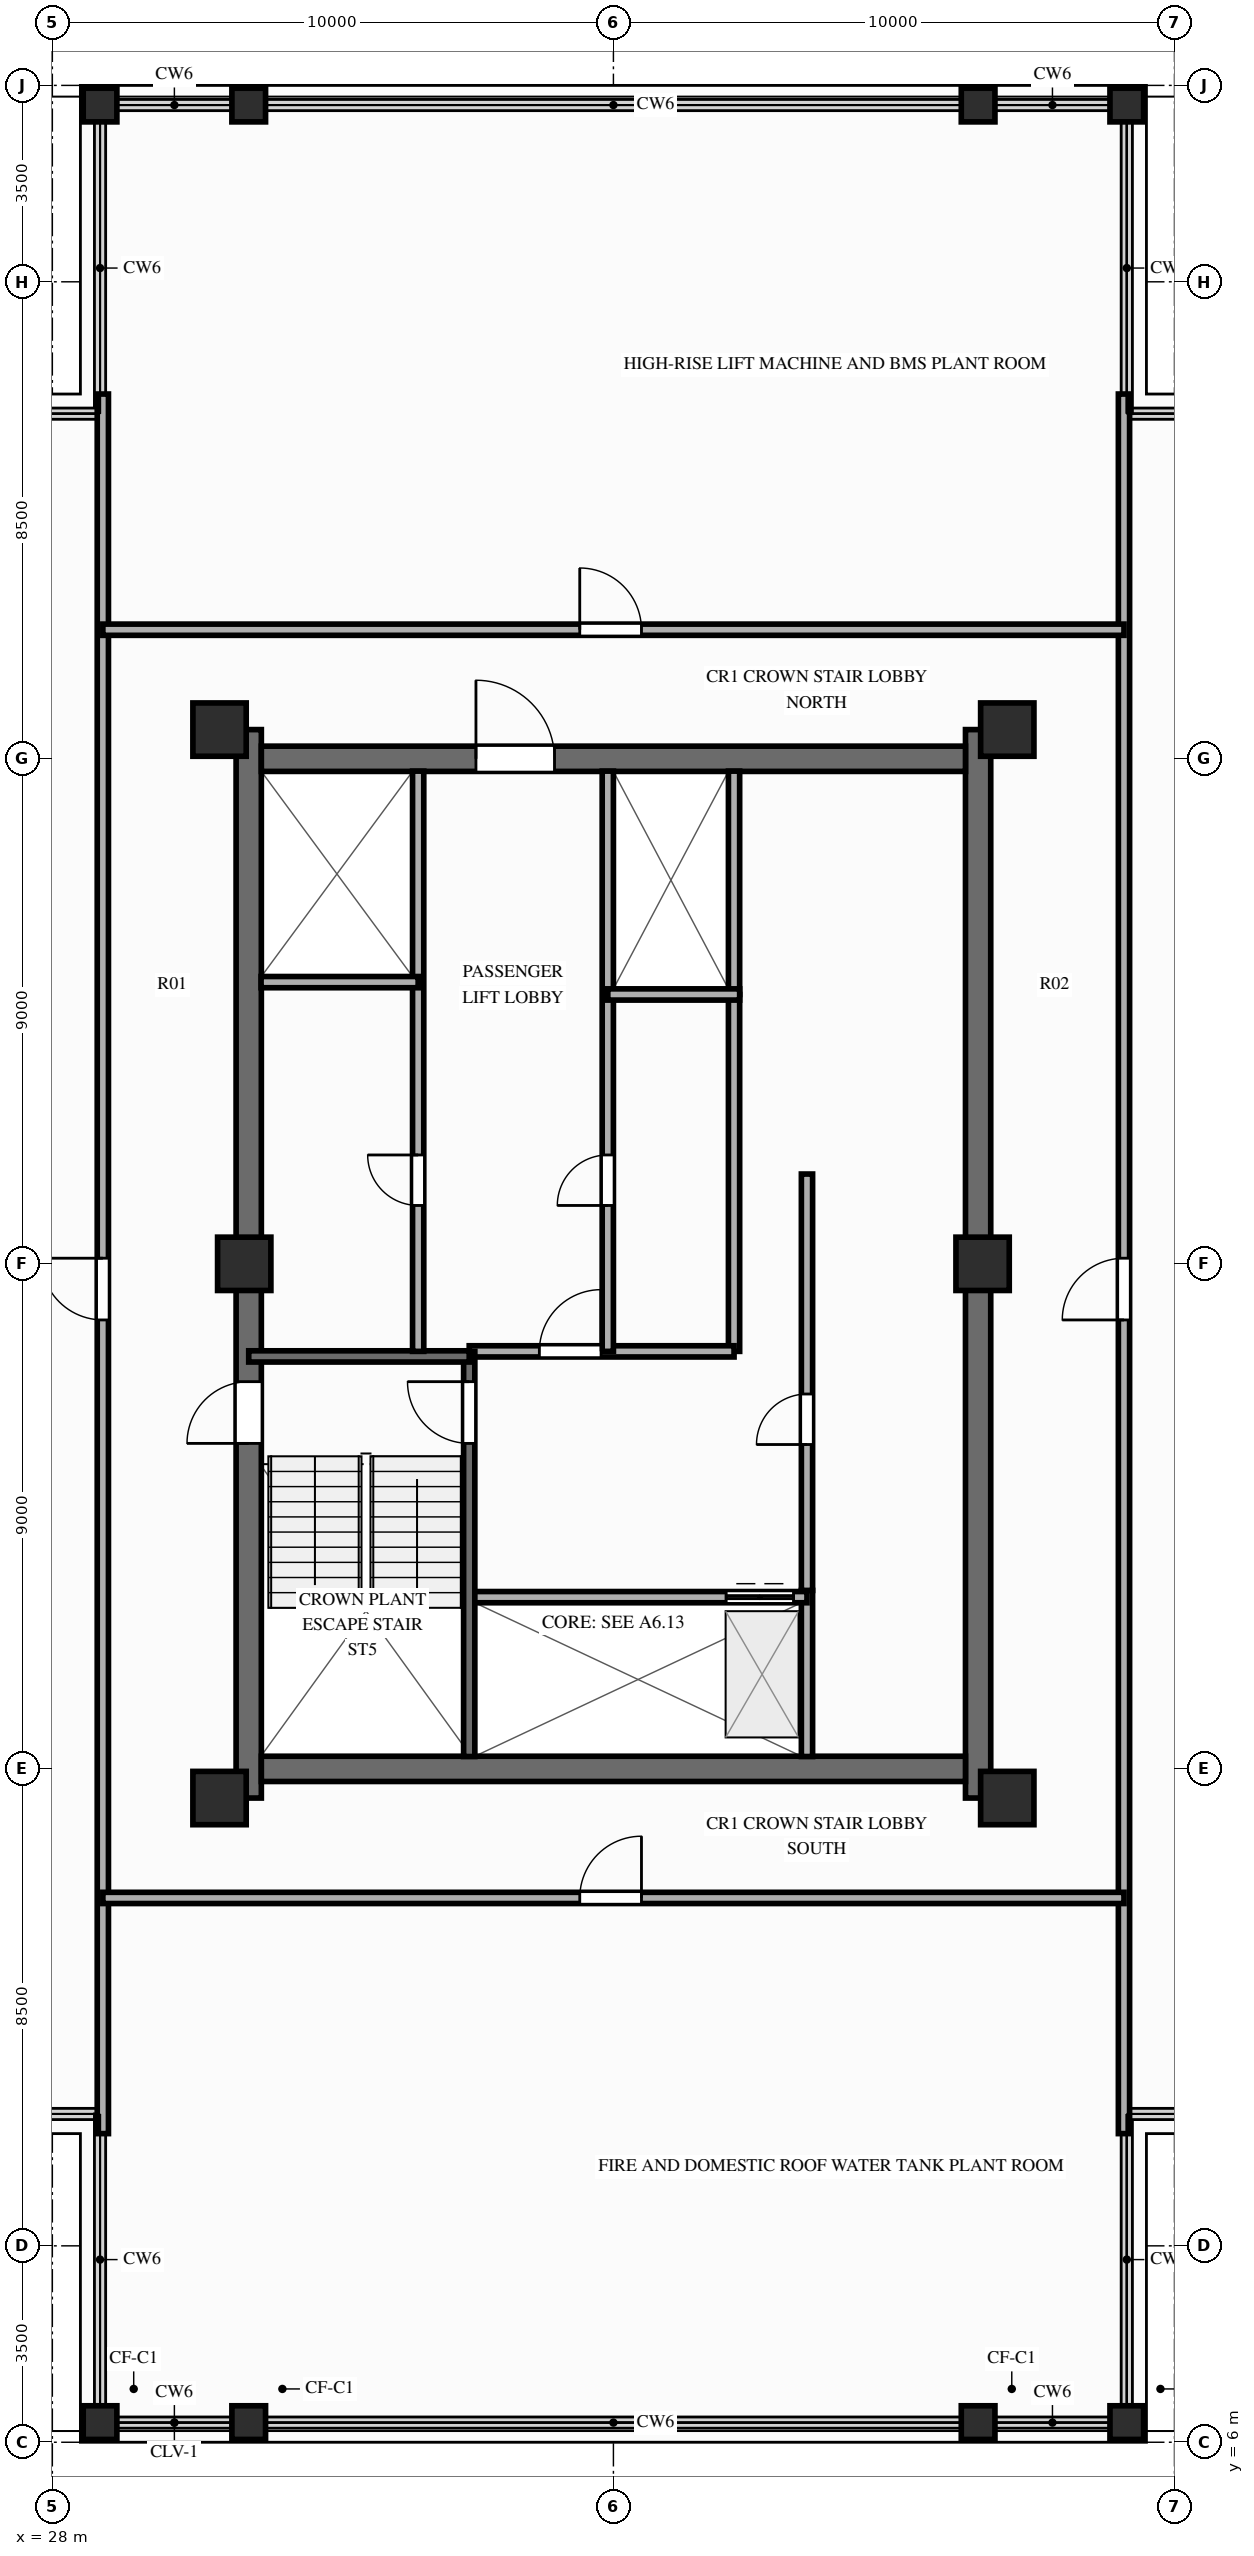
"""IFC4 building model, lengths in metres.
Left out: names, types, materials, properties, quantities, classifications, styles, units other than length and angle.
Written with IfcOpenShell. Run it as: python <this file> out.ifc"""

import sys

from ifc_helpers import new_model, si_unit, direction, frame, frame_2d, origin, origin_2d, place, context, subcontext, project, spatial, rectangle, extrude, source, transform, mapped, element, fill, save


model = new_model("IFC4")
c1 = context("Model", 3, precision=1e-05, world=origin(), true_north=direction((0.0, 1.0)))
c2 = subcontext(c1, "Body", "Model", "MODEL_VIEW")
j1 = project(units=[si_unit("LENGTHUNIT", "METRE"), si_unit("PLANEANGLEUNIT", "RADIAN")], contexts=[c1])
p1 = place(None, origin())
s1 = spatial("IfcSite", under=j1, at=p1, CompositionType="ELEMENT")
p2 = place(p1, origin())
s2 = spatial("IfcBuilding", under=s1, at=p2, CompositionType="ELEMENT")
p3 = place(p2, frame((0.0, 0.0, 252.2)))
s3 = spatial("IfcBuildingStorey", under=s2, at=p3, CompositionType="ELEMENT", Elevation=252.2)
p4 = place(p3, frame((31.5, 17.48, 0.0), z_axis=(0.0, 0.0, 1.0), x_axis=(0.0, 1.0, 0.0)))
e1 = element("IfcWall", 1, at=p4, inside=s3, PredefinedType="SHEAR", context=c2, shape_type="SweptSolid", body=[
    extrude(rectangle(XDim=19.04, YDim=0.45, at=frame_2d((9.52, 0.0))), origin(), (0.0, 0.0, 1.0), 3.8),
])
p5 = place(p4, frame((6.32, 0.0, 0.0)))
e2 = element("IfcOpeningElement", 2, at=p5, cuts=e1, PredefinedType="OPENING", context=c2, shape_type="SweptSolid", body=[
    extrude(rectangle(XDim=1.1, YDim=2.15, at=frame_2d((0.55, 1.075))), frame((0.0, 0.237, 0.0), z_axis=(0.0, -1.0, 0.0), x_axis=(1.0, 0.0, 0.0)), (0.0, 0.0, 1.0), 0.474),
])
p6 = place(p3, frame((44.5, 17.48, 0.0), z_axis=(0.0, 0.0, 1.0), x_axis=(0.0, 1.0, 0.0)))
e3 = element("IfcWall", 3, at=p6, inside=s3, PredefinedType="SHEAR", context=c2, shape_type="SweptSolid", body=[
    extrude(rectangle(XDim=19.04, YDim=0.45, at=frame_2d((9.52, 0.0))), origin(), (0.0, 0.0, 1.0), 3.8),
])
p7 = place(p3, frame((31.725, 18.0, 0.0), z_axis=(0.0, 0.0, 1.0), x_axis=(1.0, 0.0, 0.0)))
e4 = element("IfcWall", 4, at=p7, inside=s3, PredefinedType="SHEAR", context=c2, shape_type="SweptSolid", body=[
    extrude(rectangle(XDim=12.55, YDim=0.45, at=frame_2d((6.275, 0.0))), origin(), (0.0, 0.0, 1.0), 3.8),
])
p8 = place(p3, frame((31.725, 36.0, 0.0), z_axis=(0.0, 0.0, 1.0), x_axis=(1.0, 0.0, 0.0)))
e5 = element("IfcWall", 5, at=p8, inside=s3, PredefinedType="SHEAR", context=c2, shape_type="SweptSolid", body=[
    extrude(rectangle(XDim=12.55, YDim=0.45, at=frame_2d((6.275, 0.0))), origin(), (0.0, 0.0, 1.0), 3.8),
])
p9 = place(p8, frame((5.225, 0.0, 0.0), z_axis=(0.0, 0.0, 1.0), x_axis=(-1.0, 0.0, 0.0)))
e6 = element("IfcOpeningElement", 6, at=p9, cuts=e5, PredefinedType="OPENING", context=c2, shape_type="SweptSolid", body=[
    extrude(rectangle(XDim=1.4, YDim=2.15, at=frame_2d((0.7, 1.075))), frame((0.0, 0.237, 0.0), z_axis=(0.0, -1.0, 0.0), x_axis=(1.0, 0.0, 0.0)), (0.0, 0.0, 1.0), 0.474),
])
m1 = source(origin(), c2, "Body", "SweptSolid", [
    extrude(rectangle(XDim=0.95, YDim=0.95, at=origin_2d()), origin(), (0.0, 0.0, 1.0), 3.8),
])
for number, where, z_axis, x_axis in (
    (7, (30.98, 17.48, 0.0), (0.0, 0.0, 1.0), (1.0, 0.0, 0.0)),
    (8, (45.02, 17.48, 0.0), (0.0, 0.0, 1.0), (1.0, 0.0, 0.0)),
    (9, (30.98, 36.52, 0.0), (0.0, 0.0, 1.0), (1.0, 0.0, 0.0)),
    (10, (45.02, 36.52, 0.0), (0.0, 0.0, 1.0), (1.0, 0.0, 0.0)),
    (11, (31.42, 27.0, 0.0), (0.0, 0.0, 1.0), (1.0, 0.0, 0.0)),
    (12, (44.58, 27.0, 0.0), (0.0, 0.0, 1.0), (1.0, 0.0, 0.0)),
):
    element("IfcColumn", number, at=place(p3, frame(where, z_axis=z_axis, x_axis=x_axis)), inside=s3, PredefinedType="COLUMN", context=c2, shape_type="MappedRepresentation", body=[
        mapped(m1, transform((0.0, 0.0, 0.0), scale=1.0)),
    ])
m2 = source(origin(), c2, "Body", "SweptSolid", [
    extrude(rectangle(XDim=0.6, YDim=0.6, at=origin_2d()), origin(), (0.0, 0.0, 1.0), 3.8),
])
for number, where, z_axis, x_axis in (
    (13, (28.85, 6.35, 0.0), (0.0, 0.0, 1.0), (1.0, 0.0, 0.0)),
    (14, (31.5, 6.35, 0.0), (0.0, 0.0, 1.0), (1.0, 0.0, 0.0)),
    (15, (44.5, 6.35, 0.0), (0.0, 0.0, 1.0), (1.0, 0.0, 0.0)),
    (16, (47.15, 6.35, 0.0), (0.0, 0.0, 1.0), (1.0, 0.0, 0.0)),
    (17, (47.15, 47.65, 0.0), (0.0, 0.0, 1.0), (1.0, 0.0, 0.0)),
    (18, (44.5, 47.65, 0.0), (0.0, 0.0, 1.0), (1.0, 0.0, 0.0)),
    (19, (31.5, 47.65, 0.0), (0.0, 0.0, 1.0), (1.0, 0.0, 0.0)),
    (20, (28.85, 47.65, 0.0), (0.0, 0.0, 1.0), (1.0, 0.0, 0.0)),
):
    element("IfcColumn", number, at=place(p3, frame(where, z_axis=z_axis, x_axis=x_axis)), inside=s3, PredefinedType="COLUMN", context=c2, shape_type="MappedRepresentation", body=[
        mapped(m2, transform((0.0, 0.0, 0.0), scale=1.0)),
    ])
p10 = place(p3, frame((41.45, 18.22, 0.0), z_axis=(0.0, 0.0, 1.0), x_axis=(0.0, 1.0, 0.0)))
e21 = element("IfcWall", 21, at=p10, inside=s3, PredefinedType="PARTITIONING", context=c2, shape_type="SweptSolid", body=[
    extrude(rectangle(XDim=2.96, YDim=0.2, at=frame_2d((1.48, 0.0))), origin(), (0.0, 0.0, 1.0), 3.55),
])
p11 = place(p3, frame((41.45, 21.18, 0.0), z_axis=(0.0, 0.0, 1.0), x_axis=(0.0, 1.0, 0.0)))
e22 = element("IfcWall", 22, at=p11, inside=s3, PredefinedType="PARTITIONING", context=c2, shape_type="SweptSolid", body=[
    extrude(rectangle(XDim=7.42, YDim=0.2, at=frame_2d((3.71, 0.0))), origin(), (0.0, 0.0, 1.0), 3.55),
])
p12 = place(p11, frame((2.6, 0.0, 0.0)))
e23 = element("IfcOpeningElement", 23, at=p12, cuts=e22, PredefinedType="OPENING", context=c2, shape_type="SweptSolid", body=[
    extrude(rectangle(XDim=0.9, YDim=2.1, at=frame_2d((0.45, 1.05))), frame((0.0, 0.112, 0.0), z_axis=(0.0, -1.0, 0.0), x_axis=(1.0, 0.0, 0.0)), (0.0, 0.0, 1.0), 0.224),
])
p13 = place(p3, frame((40.15, 25.44, 0.0), z_axis=(0.0, 0.0, 1.0), x_axis=(0.0, 1.0, 0.0)))
e24 = element("IfcWall", 24, at=p13, inside=s3, PredefinedType="PARTITIONING", context=c2, shape_type="SweptSolid", body=[
    extrude(rectangle(XDim=6.36, YDim=0.2, at=frame_2d((3.18, 0.0))), origin(), (0.0, 0.0, 1.0), 3.55),
])
p14 = place(p3, frame((40.15, 31.8, 0.0), z_axis=(0.0, 0.0, 1.0), x_axis=(0.0, 1.0, 0.0)))
e25 = element("IfcWall", 25, at=p14, inside=s3, PredefinedType="PARTITIONING", context=c2, shape_type="SweptSolid", body=[
    extrude(rectangle(XDim=3.98, YDim=0.2, at=frame_2d((1.99, 0.0))), origin(), (0.0, 0.0, 1.0), 3.55),
])
p15 = place(p3, frame((35.43, 21.06, 0.0), z_axis=(0.0, 0.0, 1.0), x_axis=(1.0, 0.0, 0.0)))
e26 = element("IfcWall", 26, at=p15, inside=s3, PredefinedType="PARTITIONING", context=c2, shape_type="SweptSolid", body=[
    extrude(rectangle(XDim=6.02, YDim=0.2, at=frame_2d((3.01, 0.0))), origin(), (0.0, 0.0, 1.0), 3.55),
])
p16 = place(p15, frame((4.58, 0.0, 0.0)))
e27 = element("IfcOpeningElement", 27, at=p16, cuts=e26, PredefinedType="OPENING", context=c2, shape_type="SweptSolid", body=[
    extrude(rectangle(XDim=1.2, YDim=2.15, at=frame_2d((0.6, 1.075))), frame((0.0, 0.112, 0.0), z_axis=(0.0, -1.0, 0.0), x_axis=(1.0, 0.0, 0.0)), (0.0, 0.0, 1.0), 0.224),
])
p17 = place(p3, frame((35.43, 25.44, 0.0), z_axis=(0.0, 0.0, 1.0), x_axis=(1.0, 0.0, 0.0)))
e28 = element("IfcWall", 28, at=p17, inside=s3, PredefinedType="PARTITIONING", context=c2, shape_type="SweptSolid", body=[
    extrude(rectangle(XDim=4.72, YDim=0.2, at=frame_2d((2.36, 0.0))), origin(), (0.0, 0.0, 1.0), 2.952),
])
p18 = place(p17, frame((1.25, 0.0, 0.0)))
e29 = element("IfcOpeningElement", 29, at=p18, cuts=e28, PredefinedType="OPENING", context=c2, shape_type="SweptSolid", body=[
    extrude(rectangle(XDim=1.1, YDim=2.15, at=frame_2d((0.55, 1.075))), frame((0.0, 0.112, 0.0), z_axis=(0.0, -1.0, 0.0), x_axis=(1.0, 0.0, 0.0)), (0.0, 0.0, 1.0), 0.224),
])
p19 = place(p3, frame((35.43, 18.22, 0.0), z_axis=(0.0, 0.0, 1.0), x_axis=(0.0, 1.0, 0.0)))
e30 = element("IfcWall", 30, at=p19, inside=s3, PredefinedType="SOLIDWALL", context=c2, shape_type="SweptSolid", body=[
    extrude(rectangle(XDim=7.22, YDim=0.2, at=frame_2d((3.61, 0.0))), origin(), (0.0, 0.0, 1.0), 3.55),
])
p20 = place(p19, frame((6.68, 0.0, 0.0), z_axis=(0.0, 0.0, 1.0), x_axis=(-1.0, 0.0, 0.0)))
e31 = element("IfcOpeningElement", 31, at=p20, cuts=e30, PredefinedType="OPENING", context=c2, shape_type="SweptSolid", body=[
    extrude(rectangle(XDim=1.1, YDim=2.15, at=frame_2d((0.55, 1.075))), frame((0.0, 0.112, 0.0), z_axis=(0.0, -1.0, 0.0), x_axis=(1.0, 0.0, 0.0)), (0.0, 0.0, 1.0), 0.224),
])
p21 = place(p3, frame((31.5, 25.35, 0.0), z_axis=(0.0, 0.0, 1.0), x_axis=(1.0, 0.0, 0.0)))
e32 = element("IfcWall", 32, at=p21, inside=s3, PredefinedType="SOLIDWALL", context=c2, shape_type="SweptSolid", body=[
    extrude(rectangle(XDim=3.93, YDim=0.2, at=frame_2d((1.965, 0.0))), origin(), (0.0, 0.0, 1.0), 3.55),
])
p22 = place(p3, frame((34.52, 25.44, 0.0), z_axis=(0.0, 0.0, 1.0), x_axis=(0.0, 1.0, 0.0)))
e33 = element("IfcWall", 33, at=p22, inside=s3, PredefinedType="PARTITIONING", context=c2, shape_type="SweptSolid", body=[
    extrude(rectangle(XDim=10.34, YDim=0.2, at=frame_2d((5.17, 0.0))), origin(), (0.0, 0.0, 1.0), 3.55),
])
p23 = place(p22, frame((2.6, 0.0, 0.0)))
e34 = element("IfcOpeningElement", 34, at=p23, cuts=e33, PredefinedType="OPENING", context=c2, shape_type="SweptSolid", body=[
    extrude(rectangle(XDim=0.9, YDim=2.1, at=frame_2d((0.45, 1.05))), frame((0.0, 0.112, 0.0), z_axis=(0.0, -1.0, 0.0), x_axis=(1.0, 0.0, 0.0)), (0.0, 0.0, 1.0), 0.224),
])
p24 = place(p3, frame((31.72, 32.02, 0.0), z_axis=(0.0, 0.0, 1.0), x_axis=(1.0, 0.0, 0.0)))
e35 = element("IfcWall", 35, at=p24, inside=s3, PredefinedType="PARTITIONING", context=c2, shape_type="SweptSolid", body=[
    extrude(rectangle(XDim=2.8, YDim=0.2, at=frame_2d((1.4, 0.0))), origin(), (0.0, 0.0, 1.0), 3.55),
])
p25 = place(p3, frame((37.9, 25.44, 0.0), z_axis=(0.0, 0.0, 1.0), x_axis=(0.0, 1.0, 0.0)))
e36 = element("IfcWall", 36, at=p25, inside=s3, PredefinedType="PARTITIONING", context=c2, shape_type="SweptSolid", body=[
    extrude(rectangle(XDim=10.34, YDim=0.2, at=frame_2d((5.17, 0.0))), origin(), (0.0, 0.0, 1.0), 3.55),
])
p26 = place(p25, frame((2.6, 0.0, 0.0)))
e37 = element("IfcOpeningElement", 37, at=p26, cuts=e36, PredefinedType="OPENING", context=c2, shape_type="SweptSolid", body=[
    extrude(rectangle(XDim=0.9, YDim=2.1, at=frame_2d((0.45, 1.05))), frame((0.0, 0.112, 0.0), z_axis=(0.0, -1.0, 0.0), x_axis=(1.0, 0.0, 0.0)), (0.0, 0.0, 1.0), 0.224),
])
p27 = place(p3, frame((37.9, 31.8, 0.0), z_axis=(0.0, 0.0, 1.0), x_axis=(1.0, 0.0, 0.0)))
e38 = element("IfcWall", 38, at=p27, inside=s3, PredefinedType="PARTITIONING", context=c2, shape_type="SweptSolid", body=[
    extrude(rectangle(XDim=2.35, YDim=0.2, at=frame_2d((1.175, 0.0))), origin(), (0.0, 0.0, 1.0), 3.55),
])
p28 = place(p3, frame((28.9, 11.5, 0.0), z_axis=(0.0, 0.0, 1.0), x_axis=(0.0, 1.0, 0.0)))
e39 = element("IfcWall", 39, at=p28, inside=s3, PredefinedType="PARTITIONING", context=c2, shape_type="SweptSolid", body=[
    extrude(rectangle(XDim=31.0, YDim=0.2, at=frame_2d((15.5, 0.0))), origin(), (0.0, 0.0, 1.0), 3.55),
])
p29 = place(p28, frame((14.5, 0.0, 0.0)))
e40 = element("IfcOpeningElement", 40, at=p29, cuts=e39, PredefinedType="OPENING", context=c2, shape_type="SweptSolid", body=[
    extrude(rectangle(XDim=1.1, YDim=2.15, at=frame_2d((0.55, 1.075))), frame((0.0, 0.112, 0.0), z_axis=(0.0, -1.0, 0.0), x_axis=(1.0, 0.0, 0.0)), (0.0, 0.0, 1.0), 0.224),
])
p30 = place(p3, frame((47.1, 11.5, 0.0), z_axis=(0.0, 0.0, 1.0), x_axis=(0.0, 1.0, 0.0)))
e41 = element("IfcWall", 41, at=p30, inside=s3, PredefinedType="PARTITIONING", context=c2, shape_type="SweptSolid", body=[
    extrude(rectangle(XDim=31.0, YDim=0.2, at=frame_2d((15.5, 0.0))), origin(), (0.0, 0.0, 1.0), 3.55),
])
p31 = place(p30, frame((14.5, 0.0, 0.0)))
e42 = element("IfcOpeningElement", 42, at=p31, cuts=e41, PredefinedType="OPENING", context=c2, shape_type="SweptSolid", body=[
    extrude(rectangle(XDim=1.1, YDim=2.15, at=frame_2d((0.55, 1.075))), frame((0.0, 0.112, 0.0), z_axis=(0.0, -1.0, 0.0), x_axis=(1.0, 0.0, 0.0)), (0.0, 0.0, 1.0), 0.224),
])
p32 = place(p3, frame((28.9, 15.7, 0.0), z_axis=(0.0, 0.0, 1.0), x_axis=(1.0, 0.0, 0.0)))
e43 = element("IfcWall", 43, at=p32, inside=s3, PredefinedType="PARTITIONING", context=c2, shape_type="SweptSolid", body=[
    extrude(rectangle(XDim=18.2, YDim=0.2, at=frame_2d((9.1, 0.0))), origin(), (0.0, 0.0, 1.0), 3.55),
])
p33 = place(p32, frame((8.5, 0.0, 0.0)))
e44 = element("IfcOpeningElement", 44, at=p33, cuts=e43, PredefinedType="OPENING", context=c2, shape_type="SweptSolid", body=[
    extrude(rectangle(XDim=1.1, YDim=2.15, at=frame_2d((0.55, 1.075))), frame((0.0, 0.112, 0.0), z_axis=(0.0, -1.0, 0.0), x_axis=(1.0, 0.0, 0.0)), (0.0, 0.0, 1.0), 0.224),
])
p34 = place(p3, frame((28.9, 38.3, 0.0), z_axis=(0.0, 0.0, 1.0), x_axis=(1.0, 0.0, 0.0)))
e45 = element("IfcWall", 45, at=p34, inside=s3, PredefinedType="PARTITIONING", context=c2, shape_type="SweptSolid", body=[
    extrude(rectangle(XDim=18.2, YDim=0.2, at=frame_2d((9.1, 0.0))), origin(), (0.0, 0.0, 1.0), 3.55),
])
p35 = place(p34, frame((8.5, 0.0, 0.0)))
e46 = element("IfcOpeningElement", 46, at=p35, cuts=e45, PredefinedType="OPENING", context=c2, shape_type="SweptSolid", body=[
    extrude(rectangle(XDim=1.1, YDim=2.15, at=frame_2d((0.55, 1.075))), frame((0.0, 0.112, 0.0), z_axis=(0.0, -1.0, 0.0), x_axis=(1.0, 0.0, 0.0)), (0.0, 0.0, 1.0), 0.224),
])
m3 = source(origin(), c2, "Body", "SweptSolid", [
    extrude(rectangle(XDim=1.1, YDim=2.15, at=frame_2d((0.55, 1.075))), frame((0.0, 0.025, 0.0), z_axis=(0.0, -1.0, 0.0), x_axis=(1.0, 0.0, 0.0)), (0.0, 0.0, 1.0), 0.05),
])
p36 = place(p5, origin())
e47 = element("IfcDoor", 47, at=p36, inside=s3, OperationType="SINGLE_SWING_LEFT", PredefinedType="DOOR", context=c2, shape_type="MappedRepresentation", body=[
    mapped(m3, transform((0.0, 0.0, 0.0), scale=1.0)),
])
fill(e2, e47)
m4 = source(origin(), c2, "Body", "SweptSolid", [
    extrude(rectangle(XDim=1.4, YDim=2.15, at=frame_2d((0.7, 1.075))), frame((0.0, 0.025, 0.0), z_axis=(0.0, -1.0, 0.0), x_axis=(1.0, 0.0, 0.0)), (0.0, 0.0, 1.0), 0.05),
])
p37 = place(p9, origin())
e48 = element("IfcDoor", 48, at=p37, inside=s3, OperationType="SINGLE_SWING_RIGHT", PredefinedType="DOOR", context=c2, shape_type="MappedRepresentation", body=[
    mapped(m4, transform((0.0, 0.0, 0.0), scale=1.0)),
])
fill(e6, e48)
m5 = source(origin(), c2, "Body", "SweptSolid", [
    extrude(rectangle(XDim=0.9, YDim=2.1, at=frame_2d((0.45, 1.05))), frame((0.0, 0.025, 0.0), z_axis=(0.0, -1.0, 0.0), x_axis=(1.0, 0.0, 0.0)), (0.0, 0.0, 1.0), 0.05),
])
p38 = place(p12, origin())
e49 = element("IfcDoor", 49, at=p38, inside=s3, OperationType="SINGLE_SWING_LEFT", PredefinedType="DOOR", context=c2, shape_type="MappedRepresentation", body=[
    mapped(m5, transform((0.0, 0.0, 0.0), scale=1.0)),
])
fill(e23, e49)
m6 = source(origin(), c2, "Body", "SweptSolid", [
    extrude(rectangle(XDim=1.2, YDim=2.15, at=frame_2d((0.6, 1.075))), frame((0.0, 0.025, 0.0), z_axis=(0.0, -1.0, 0.0), x_axis=(1.0, 0.0, 0.0)), (0.0, 0.0, 1.0), 0.05),
])
p39 = place(p16, origin())
e50 = element("IfcDoor", 50, at=p39, inside=s3, OperationType="DOUBLE_DOOR_SLIDING", PredefinedType="DOOR", context=c2, shape_type="MappedRepresentation", body=[
    mapped(m6, transform((0.0, 0.0, 0.0), scale=1.0)),
])
fill(e27, e50)
p40 = place(p18, origin())
e51 = element("IfcDoor", 51, at=p40, inside=s3, OperationType="SINGLE_SWING_RIGHT", PredefinedType="DOOR", context=c2, shape_type="MappedRepresentation", body=[
    mapped(m3, transform((0.0, 0.0, 0.0), scale=1.0)),
])
fill(e29, e51)
p41 = place(p20, origin())
e52 = element("IfcDoor", 52, at=p41, inside=s3, OperationType="SINGLE_SWING_LEFT", PredefinedType="DOOR", context=c2, shape_type="MappedRepresentation", body=[
    mapped(m3, transform((0.0, 0.0, 0.0), scale=1.0)),
])
fill(e31, e52)
p42 = place(p23, origin())
e53 = element("IfcDoor", 53, at=p42, inside=s3, OperationType="SINGLE_SWING_RIGHT", PredefinedType="DOOR", context=c2, shape_type="MappedRepresentation", body=[
    mapped(m5, transform((0.0, 0.0, 0.0), scale=1.0)),
])
fill(e34, e53)
p43 = place(p26, origin())
e54 = element("IfcDoor", 54, at=p43, inside=s3, OperationType="SINGLE_SWING_LEFT", PredefinedType="DOOR", context=c2, shape_type="MappedRepresentation", body=[
    mapped(m5, transform((0.0, 0.0, 0.0), scale=1.0)),
])
fill(e37, e54)
p44 = place(p29, origin())
e55 = element("IfcDoor", 55, at=p44, inside=s3, OperationType="SINGLE_SWING_RIGHT", PredefinedType="DOOR", context=c2, shape_type="MappedRepresentation", body=[
    mapped(m3, transform((0.0, 0.0, 0.0), scale=1.0)),
])
fill(e40, e55)
p45 = place(p31, origin())
e56 = element("IfcDoor", 56, at=p45, inside=s3, OperationType="SINGLE_SWING_LEFT", PredefinedType="DOOR", context=c2, shape_type="MappedRepresentation", body=[
    mapped(m3, transform((0.0, 0.0, 0.0), scale=1.0)),
])
fill(e42, e56)
p46 = place(p33, origin())
e57 = element("IfcDoor", 57, at=p46, inside=s3, OperationType="SINGLE_SWING_RIGHT", PredefinedType="DOOR", context=c2, shape_type="MappedRepresentation", body=[
    mapped(m3, transform((0.0, 0.0, 0.0), scale=1.0)),
])
fill(e44, e57)
p47 = place(p35, origin())
e58 = element("IfcDoor", 58, at=p47, inside=s3, OperationType="SINGLE_SWING_LEFT", PredefinedType="DOOR", context=c2, shape_type="MappedRepresentation", body=[
    mapped(m3, transform((0.0, 0.0, 0.0), scale=1.0)),
])
fill(e46, e58)
save(model, sys.argv[1])
